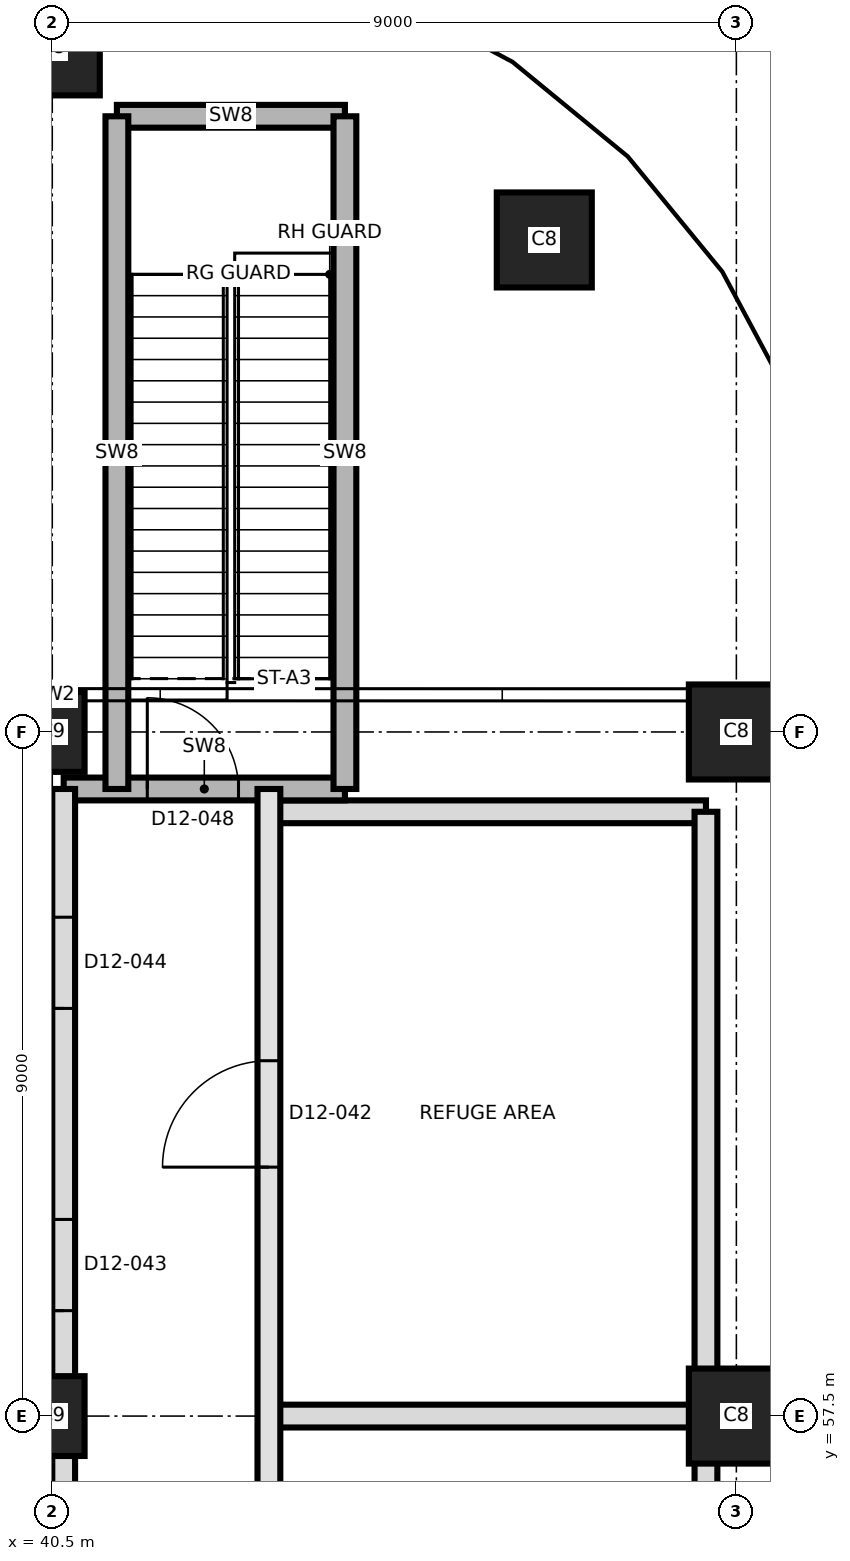
"""IFC4 building model, lengths in metres.
Left out: names, types, materials, properties, quantities, classifications, styles, units other than length and angle.
Written with IfcOpenShell. Run it as: python <this file> out.ifc"""

import sys

from ifc_helpers import new_model, si_unit, direction, frame, frame_2d, origin, origin_2d, place, context, subcontext, project, spatial, rectangle, extrude, element, fill, save


model = new_model("IFC4")
c1 = context("Model", 3, precision=1e-05, world=origin(), true_north=direction((0.0, 1.0)))
c2 = subcontext(c1, "Body", "Model", "MODEL_VIEW")
j1 = project(units=[si_unit("LENGTHUNIT", "METRE"), si_unit("PLANEANGLEUNIT", "RADIAN")], contexts=[c1])
p1 = place(None, origin())
s1 = spatial("IfcSite", under=j1, at=p1, CompositionType="ELEMENT")
p2 = place(p1, origin())
s2 = spatial("IfcBuilding", under=s1, at=p2, CompositionType="ELEMENT")
p3 = place(p2, frame((0.0, 0.0, 135.2)))
s3 = spatial("IfcBuildingStorey", under=s2, at=p3, CompositionType="ELEMENT", Elevation=135.2)
p4 = place(p3, frame((40.5, 57.5, 0.0), z_axis=(0.0, 0.0, 1.0), x_axis=(0.0, 1.0, 0.0)))
e1 = element("IfcColumn", 1, at=p4, inside=s3, PredefinedType="COLUMN", context=c2, shape_type="SweptSolid", body=[
    extrude(rectangle(XDim=1.05, YDim=0.85, at=origin_2d()), origin(), (0.0, 0.0, 1.0), 7.0),
])
p5 = place(p3, frame((49.5, 57.5, 0.0), z_axis=(0.0, 0.0, 1.0), x_axis=(1.0, 0.0, 0.0)))
e2 = element("IfcColumn", 2, at=p5, inside=s3, PredefinedType="COLUMN", context=c2, shape_type="SweptSolid", body=[
    extrude(rectangle(XDim=1.25, YDim=1.25, at=origin_2d()), origin(), (0.0, 0.0, 1.0), 7.0),
])
p6 = place(p3, frame((40.5, 66.5, 0.0), z_axis=(0.0, 0.0, 1.0), x_axis=(0.0, 1.0, 0.0)))
e3 = element("IfcColumn", 3, at=p6, inside=s3, PredefinedType="COLUMN", context=c2, shape_type="SweptSolid", body=[
    extrude(rectangle(XDim=1.05, YDim=0.85, at=origin_2d()), origin(), (0.0, 0.0, 1.0), 7.0),
])
for number, where, z_axis, x_axis in (
    (4, (49.5, 66.5, 0.0), (0.0, 0.0, 1.0), (1.0, 0.0, 0.0)),
    (5, (46.973, 72.973, 0.0), (0.0, 0.0, 1.0), (1.0, 0.0, 0.0)),
    (6, (40.5, 75.5, 0.0), (0.0, 0.0, 1.0), (1.0, 0.0, 0.0)),
):
    element("IfcColumn", number, at=place(p3, frame(where, z_axis=z_axis, x_axis=x_axis)), inside=s3, PredefinedType="COLUMN", context=c2, shape_type="SweptSolid", body=[
        extrude(rectangle(XDim=1.25, YDim=1.25, at=origin_2d()), origin(), (0.0, 0.0, 1.0), 7.0),
    ])
p7 = place(p3, frame((31.9, 57.5, 0.0), z_axis=(0.0, 0.0, 1.0), x_axis=(1.0, 0.0, 0.0)))
e7 = element("IfcWall", 7, at=p7, inside=s3, PredefinedType="PARTITIONING", context=c2, shape_type="SweptSolid", body=[
    extrude(rectangle(XDim=8.75, YDim=0.3, at=frame_2d((4.375, 0.0))), origin(), (0.0, 0.0, 1.0), 6.7),
])
p8 = place(p3, frame((43.35, 57.5, 0.0), z_axis=(0.0, 0.0, 1.0), x_axis=(1.0, 0.0, 0.0)))
e8 = element("IfcWall", 8, at=p8, inside=s3, PredefinedType="PARTITIONING", context=c2, shape_type="SweptSolid", body=[
    extrude(rectangle(XDim=5.75, YDim=0.3, at=frame_2d((2.875, 0.0))), origin(), (0.0, 0.0, 1.0), 6.7),
])
for number, where, z_axis, x_axis in (
    (9, (31.9, 61.475, 0.0), (0.0, 0.0, 1.0), (1.0, 0.0, 0.0)),
    (10, (31.9, 65.45, 0.0), (0.0, 0.0, 1.0), (1.0, 0.0, 0.0)),
):
    element("IfcWall", number, at=place(p3, frame(where, z_axis=z_axis, x_axis=x_axis)), inside=s3, PredefinedType="PARTITIONING", context=c2, shape_type="SweptSolid", body=[
        extrude(rectangle(XDim=8.75, YDim=0.3, at=frame_2d((4.375, 0.0))), origin(), (0.0, 0.0, 1.0), 6.7),
    ])
p9 = place(p3, frame((43.35, 65.45, 0.0), z_axis=(0.0, 0.0, 1.0), x_axis=(1.0, 0.0, 0.0)))
e11 = element("IfcWall", 11, at=p9, inside=s3, PredefinedType="PARTITIONING", context=c2, shape_type="SweptSolid", body=[
    extrude(rectangle(XDim=5.75, YDim=0.3, at=frame_2d((2.875, 0.0))), origin(), (0.0, 0.0, 1.0), 6.7),
])
p10 = place(p3, frame((40.65, 65.75, 0.0), z_axis=(0.0, 0.0, 1.0), x_axis=(1.0, 0.0, 0.0)))
e12 = element("IfcWall", 12, at=p10, inside=s3, PredefinedType="SHEAR", context=c2, shape_type="SweptSolid", body=[
    extrude(rectangle(XDim=3.7, YDim=0.3, at=frame_2d((1.85, 0.0))), origin(), (0.0, 0.0, 1.0), 6.7),
])
p11 = place(p10, frame((1.1, 0.0, 0.0)))
e13 = element("IfcOpeningElement", 13, at=p11, cuts=e12, PredefinedType="OPENING", context=c2, shape_type="SweptSolid", body=[
    extrude(rectangle(XDim=1.2, YDim=2.1, at=frame_2d((0.6, 1.05))), frame((0.0, 0.16, 0.0), z_axis=(0.0, -1.0, 0.0), x_axis=(1.0, 0.0, 0.0)), (0.0, 0.0, 1.0), 0.32),
])
p12 = place(p3, frame((41.35, 74.6, 0.0), z_axis=(0.0, 0.0, 1.0), x_axis=(1.0, 0.0, 0.0)))
e14 = element("IfcWall", 14, at=p12, inside=s3, PredefinedType="SHEAR", context=c2, shape_type="SweptSolid", body=[
    extrude(rectangle(XDim=3.0, YDim=0.3, at=frame_2d((1.5, 0.0))), origin(), (0.0, 0.0, 1.0), 6.7),
])
p13 = place(p3, frame((40.65, 39.8, 0.0), z_axis=(0.0, 0.0, 1.0), x_axis=(0.0, 1.0, 0.0)))
e15 = element("IfcWall", 15, at=p13, inside=s3, PredefinedType="PARTITIONING", context=c2, shape_type="SweptSolid", body=[
    extrude(rectangle(XDim=25.95, YDim=0.3, at=frame_2d((12.975, 0.0))), origin(), (0.0, 0.0, 1.0), 6.7),
])
p14 = place(p13, frame((1.35, 0.0, 0.0)))
e16 = element("IfcOpeningElement", 16, at=p14, cuts=e15, PredefinedType="OPENING", context=c2, shape_type="SweptSolid", body=[
    extrude(rectangle(XDim=1.2, YDim=2.1, at=frame_2d((0.6, 1.05))), frame((0.0, 0.16, 0.0), z_axis=(0.0, -1.0, 0.0), x_axis=(1.0, 0.0, 0.0)), (0.0, 0.0, 1.0), 0.32),
])
p15 = place(p13, frame((5.85, 0.0, 0.0)))
e17 = element("IfcOpeningElement", 17, at=p15, cuts=e15, PredefinedType="OPENING", context=c2, shape_type="SweptSolid", body=[
    extrude(rectangle(XDim=1.2, YDim=2.1, at=frame_2d((0.6, 1.05))), frame((0.0, 0.16, 0.0), z_axis=(0.0, -1.0, 0.0), x_axis=(1.0, 0.0, 0.0)), (0.0, 0.0, 1.0), 0.32),
])
p16 = place(p13, frame((10.35, 0.0, 0.0)))
e18 = element("IfcOpeningElement", 18, at=p16, cuts=e15, PredefinedType="OPENING", context=c2, shape_type="SweptSolid", body=[
    extrude(rectangle(XDim=1.2, YDim=2.1, at=frame_2d((0.6, 1.05))), frame((0.0, 0.16, 0.0), z_axis=(0.0, -1.0, 0.0), x_axis=(1.0, 0.0, 0.0)), (0.0, 0.0, 1.0), 0.32),
])
p17 = place(p13, frame((14.85, 0.0, 0.0)))
e19 = element("IfcOpeningElement", 19, at=p17, cuts=e15, PredefinedType="OPENING", context=c2, shape_type="SweptSolid", body=[
    extrude(rectangle(XDim=1.2, YDim=2.1, at=frame_2d((0.6, 1.05))), frame((0.0, 0.16, 0.0), z_axis=(0.0, -1.0, 0.0), x_axis=(1.0, 0.0, 0.0)), (0.0, 0.0, 1.0), 0.32),
])
p18 = place(p13, frame((19.087, 0.0, 0.0)))
e20 = element("IfcOpeningElement", 20, at=p18, cuts=e15, PredefinedType="OPENING", context=c2, shape_type="SweptSolid", body=[
    extrude(rectangle(XDim=1.2, YDim=2.1, at=frame_2d((0.6, 1.05))), frame((0.0, 0.16, 0.0), z_axis=(0.0, -1.0, 0.0), x_axis=(1.0, 0.0, 0.0)), (0.0, 0.0, 1.0), 0.32),
])
p19 = place(p13, frame((23.063, 0.0, 0.0)))
e21 = element("IfcOpeningElement", 21, at=p19, cuts=e15, PredefinedType="OPENING", context=c2, shape_type="SweptSolid", body=[
    extrude(rectangle(XDim=1.2, YDim=2.1, at=frame_2d((0.6, 1.05))), frame((0.0, 0.16, 0.0), z_axis=(0.0, -1.0, 0.0), x_axis=(1.0, 0.0, 0.0)), (0.0, 0.0, 1.0), 0.32),
])
p20 = place(p3, frame((41.35, 65.75, 0.0), z_axis=(0.0, 0.0, 1.0), x_axis=(0.0, 1.0, 0.0)))
e22 = element("IfcWall", 22, at=p20, inside=s3, PredefinedType="SHEAR", context=c2, shape_type="SweptSolid", body=[
    extrude(rectangle(XDim=8.85, YDim=0.3, at=frame_2d((4.425, 0.0))), origin(), (0.0, 0.0, 1.0), 6.7),
])
p21 = place(p3, frame((43.35, 39.8, 0.0), z_axis=(0.0, 0.0, 1.0), x_axis=(0.0, 1.0, 0.0)))
e23 = element("IfcWall", 23, at=p21, inside=s3, PredefinedType="SOLIDWALL", context=c2, shape_type="SweptSolid", body=[
    extrude(rectangle(XDim=25.95, YDim=0.3, at=frame_2d((12.975, 0.0))), origin(), (0.0, 0.0, 1.0), 6.7),
])
p22 = place(p21, frame((1.35, 0.0, 0.0)))
e24 = element("IfcOpeningElement", 24, at=p22, cuts=e23, PredefinedType="OPENING", context=c2, shape_type="SweptSolid", body=[
    extrude(rectangle(XDim=1.2, YDim=2.1, at=frame_2d((0.6, 1.05))), frame((0.0, 0.16, 0.0), z_axis=(0.0, -1.0, 0.0), x_axis=(1.0, 0.0, 0.0)), (0.0, 0.0, 1.0), 0.32),
])
p23 = place(p21, frame((5.85, 0.0, 0.0)))
e25 = element("IfcOpeningElement", 25, at=p23, cuts=e23, PredefinedType="OPENING", context=c2, shape_type="SweptSolid", body=[
    extrude(rectangle(XDim=1.2, YDim=2.1, at=frame_2d((0.6, 1.05))), frame((0.0, 0.16, 0.0), z_axis=(0.0, -1.0, 0.0), x_axis=(1.0, 0.0, 0.0)), (0.0, 0.0, 1.0), 0.32),
])
p24 = place(p21, frame((10.35, 0.0, 0.0)))
e26 = element("IfcOpeningElement", 26, at=p24, cuts=e23, PredefinedType="OPENING", context=c2, shape_type="SweptSolid", body=[
    extrude(rectangle(XDim=1.2, YDim=2.1, at=frame_2d((0.6, 1.05))), frame((0.0, 0.16, 0.0), z_axis=(0.0, -1.0, 0.0), x_axis=(1.0, 0.0, 0.0)), (0.0, 0.0, 1.0), 0.32),
])
p25 = place(p21, frame((14.85, 0.0, 0.0)))
e27 = element("IfcOpeningElement", 27, at=p25, cuts=e23, PredefinedType="OPENING", context=c2, shape_type="SweptSolid", body=[
    extrude(rectangle(XDim=1.2, YDim=2.1, at=frame_2d((0.6, 1.05))), frame((0.0, 0.16, 0.0), z_axis=(0.0, -1.0, 0.0), x_axis=(1.0, 0.0, 0.0)), (0.0, 0.0, 1.0), 0.32),
])
p26 = place(p21, frame((20.975, 0.0, 0.0)))
e28 = element("IfcOpeningElement", 28, at=p26, cuts=e23, PredefinedType="OPENING", context=c2, shape_type="SweptSolid", body=[
    extrude(rectangle(XDim=1.4, YDim=2.1, at=frame_2d((0.7, 1.05))), frame((0.0, 0.16, 0.0), z_axis=(0.0, -1.0, 0.0), x_axis=(1.0, 0.0, 0.0)), (0.0, 0.0, 1.0), 0.32),
])
p27 = place(p3, frame((44.35, 65.75, 0.0), z_axis=(0.0, 0.0, 1.0), x_axis=(0.0, 1.0, 0.0)))
e29 = element("IfcWall", 29, at=p27, inside=s3, PredefinedType="SHEAR", context=c2, shape_type="SweptSolid", body=[
    extrude(rectangle(XDim=8.85, YDim=0.3, at=frame_2d((4.425, 0.0))), origin(), (0.0, 0.0, 1.0), 6.7),
])
p28 = place(p3, frame((49.1, 49.069, 0.0), z_axis=(0.0, 0.0, 1.0), x_axis=(0.0, 1.0, 0.0)))
e30 = element("IfcWall", 30, at=p28, inside=s3, PredefinedType="PARTITIONING", context=c2, shape_type="SweptSolid", body=[
    extrude(rectangle(XDim=16.381, YDim=0.3, at=frame_2d((8.19, 0.0))), origin(), (0.0, 0.0, 1.0), 6.7),
])
p29 = place(p26, origin())
e31 = element("IfcDoor", 31, at=p29, inside=s3, OperationType="SINGLE_SWING_LEFT", PredefinedType="DOOR", context=c2, shape_type="SweptSolid", body=[
    extrude(rectangle(XDim=1.4, YDim=2.1, at=frame_2d((0.7, 1.05))), frame((0.0, 0.025, 0.0), z_axis=(0.0, -1.0, 0.0), x_axis=(1.0, 0.0, 0.0)), (0.0, 0.0, 1.0), 0.05),
])
fill(e28, e31)
p30 = place(p18, origin())
e32 = element("IfcDoor", 32, at=p30, inside=s3, OperationType="SINGLE_SWING_RIGHT", PredefinedType="DOOR", context=c2, shape_type="SweptSolid", body=[
    extrude(rectangle(XDim=1.2, YDim=2.1, at=frame_2d((0.6, 1.05))), frame((0.0, 0.025, 0.0), z_axis=(0.0, -1.0, 0.0), x_axis=(1.0, 0.0, 0.0)), (0.0, 0.0, 1.0), 0.05),
])
fill(e20, e32)
p31 = place(p19, origin())
e33 = element("IfcDoor", 33, at=p31, inside=s3, OperationType="SINGLE_SWING_LEFT", PredefinedType="DOOR", context=c2, shape_type="SweptSolid", body=[
    extrude(rectangle(XDim=1.2, YDim=2.1, at=frame_2d((0.6, 1.05))), frame((0.0, 0.025, 0.0), z_axis=(0.0, -1.0, 0.0), x_axis=(1.0, 0.0, 0.0)), (0.0, 0.0, 1.0), 0.05),
])
fill(e21, e33)
p32 = place(p11, origin())
e34 = element("IfcDoor", 34, at=p32, inside=s3, OperationType="SINGLE_SWING_RIGHT", PredefinedType="DOOR", context=c2, shape_type="SweptSolid", body=[
    extrude(rectangle(XDim=1.2, YDim=2.1, at=frame_2d((0.6, 1.05))), frame((0.0, 0.025, 0.0), z_axis=(0.0, -1.0, 0.0), x_axis=(1.0, 0.0, 0.0)), (0.0, 0.0, 1.0), 0.05),
])
fill(e13, e34)
save(model, sys.argv[1])
